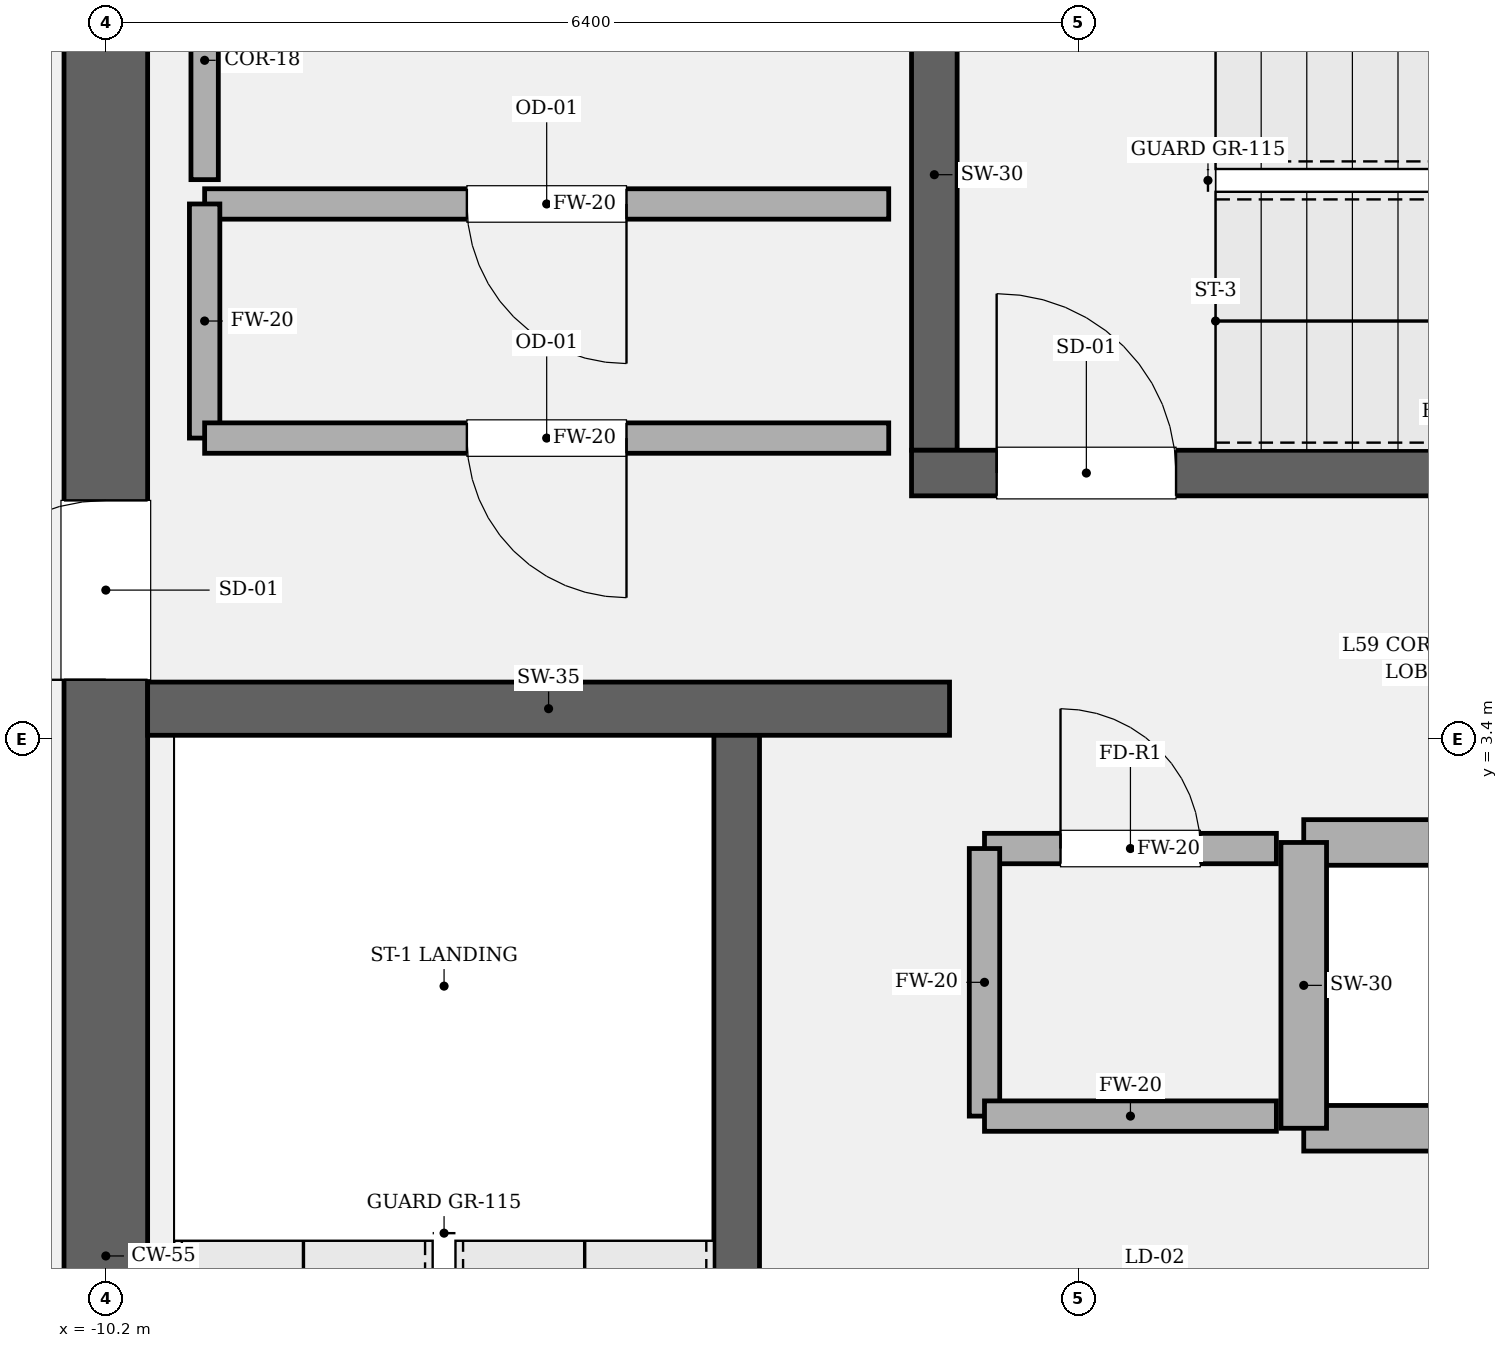
"""IFC4 building model, lengths in metres.
Left out: names, types, materials, properties, quantities, classifications, styles, units other than length and angle.
Written with IfcOpenShell. Run it as: python <this file> out.ifc"""

import sys

from ifc_helpers import new_model, si_unit, direction, frame, frame_2d, origin, place, context, subcontext, project, spatial, rectangle, extrude, element, fill, save


model = new_model("IFC4")
c1 = context("Model", 3, precision=1e-05, world=origin(), true_north=direction((0.0, 1.0)))
c2 = subcontext(c1, "Body", "Model", "MODEL_VIEW")
j1 = project(units=[si_unit("LENGTHUNIT", "METRE"), si_unit("PLANEANGLEUNIT", "RADIAN")], contexts=[c1])
p1 = place(None, origin())
s1 = spatial("IfcSite", under=j1, at=p1, CompositionType="ELEMENT")
p2 = place(p1, origin())
s2 = spatial("IfcBuilding", under=s1, at=p2, CompositionType="ELEMENT")
p3 = place(p2, frame((0.0, 0.0, 251.4)))
s3 = spatial("IfcBuildingStorey", under=s2, at=p3, CompositionType="ELEMENT", Elevation=251.4)
p4 = place(p3, frame((-10.2, -8.925, 0.0), z_axis=(0.0, 0.0, 1.0), x_axis=(0.0, 1.0, 0.0)))
e1 = element("IfcWall", 1, at=p4, inside=s3, PredefinedType="SHEAR", context=c2, shape_type="SweptSolid", body=[
    extrude(rectangle(XDim=17.85, YDim=0.55, at=frame_2d((8.925, 0.0))), origin(), (0.0, 0.0, 1.0), 4.05),
])
p5 = place(p4, frame((12.715, 0.0, 0.0)))
e2 = element("IfcOpeningElement", 2, at=p5, cuts=e1, PredefinedType="OPENING", context=c2, shape_type="SweptSolid", body=[
    extrude(rectangle(XDim=1.18, YDim=2.2, at=frame_2d((0.59, 1.1))), frame((0.0, 0.285, 0.0), z_axis=(0.0, -1.0, 0.0), x_axis=(1.0, 0.0, 0.0)), (0.0, 0.0, 1.0), 0.57),
])
p6 = place(p3, frame((-6.05, -5.5, 0.0), z_axis=(0.0, 0.0, 1.0), x_axis=(0.0, 1.0, 0.0)))
e3 = element("IfcWall", 3, at=p6, inside=s3, PredefinedType="SOLIDWALL", context=c2, shape_type="SweptSolid", body=[
    extrude(rectangle(XDim=8.95, YDim=0.3, at=frame_2d((4.475, 0.0))), origin(), (0.0, 0.0, 1.0), 4.05),
])
p7 = place(p3, frame((-4.75, 5.3, 0.0), z_axis=(0.0, 0.0, 1.0), x_axis=(0.0, 1.0, 0.0)))
e4 = element("IfcWall", 4, at=p7, inside=s3, PredefinedType="SOLIDWALL", context=c2, shape_type="SweptSolid", body=[
    extrude(rectangle(XDim=3.625, YDim=0.3, at=frame_2d((1.812, 0.0))), origin(), (0.0, 0.0, 1.0), 4.05),
])
p8 = place(p3, frame((-4.9, 5.15, 0.0), z_axis=(0.0, 0.0, 1.0), x_axis=(1.0, 0.0, 0.0)))
e5 = element("IfcWall", 5, at=p8, inside=s3, PredefinedType="SOLIDWALL", context=c2, shape_type="SweptSolid", body=[
    extrude(rectangle(XDim=9.8, YDim=0.3, at=frame_2d((4.9, 0.0))), origin(), (0.0, 0.0, 1.0), 4.05),
])
p9 = place(p8, frame((0.56, 0.0, 0.0)))
e6 = element("IfcOpeningElement", 6, at=p9, cuts=e5, PredefinedType="OPENING", context=c2, shape_type="SweptSolid", body=[
    extrude(rectangle(XDim=1.18, YDim=2.2, at=frame_2d((0.59, 1.1))), frame((0.0, 0.16, 0.0), z_axis=(0.0, -1.0, 0.0), x_axis=(1.0, 0.0, 0.0)), (0.0, 0.0, 1.0), 0.32),
])
p10 = place(p3, frame((-9.925, 3.6, 0.0), z_axis=(0.0, 0.0, 1.0), x_axis=(1.0, 0.0, 0.0)))
e7 = element("IfcWall", 7, at=p10, inside=s3, PredefinedType="SOLIDWALL", context=c2, shape_type="SweptSolid", body=[
    extrude(rectangle(XDim=5.275, YDim=0.35, at=frame_2d((2.638, 0.0))), origin(), (0.0, 0.0, 1.0), 4.05),
])
for number, where, z_axis, x_axis in (
    (8, (-2.32, 0.84, 0.0), (0.0, 0.0, 1.0), (1.0, 0.0, 0.0)),
    (9, (-2.32, 2.72, 0.0), (0.0, 0.0, 1.0), (1.0, 0.0, 0.0)),
):
    element("IfcWall", number, at=place(p3, frame(where, z_axis=z_axis, x_axis=x_axis)), inside=s3, PredefinedType="SOLIDWALL", context=c2, shape_type="SweptSolid", body=[
        extrude(rectangle(XDim=4.64, YDim=0.3, at=frame_2d((2.32, 0.0))), origin(), (0.0, 0.0, 1.0), 3.85),
    ])
p11 = place(p3, frame((-2.32, 0.84, 0.0), z_axis=(0.0, 0.0, 1.0), x_axis=(0.0, 1.0, 0.0)))
e10 = element("IfcWall", 10, at=p11, inside=s3, PredefinedType="SOLIDWALL", context=c2, shape_type="SweptSolid", body=[
    extrude(rectangle(XDim=1.88, YDim=0.3, at=frame_2d((0.94, 0.0))), origin(), (0.0, 0.0, 1.0), 3.85),
])
p12 = place(p3, frame((-2.5, 2.68, 0.0), z_axis=(0.0, 0.0, 1.0), x_axis=(-1.0, 0.0, 0.0)))
e11 = element("IfcWall", 11, at=p12, inside=s3, PredefinedType="SOLIDWALL", context=c2, shape_type="SweptSolid", body=[
    extrude(rectangle(XDim=1.92, YDim=0.2, at=frame_2d((0.96, 0.0))), origin(), (0.0, 0.0, 1.0), 3.85),
])
p13 = place(p12, frame((0.5, 0.0, 0.0)))
e12 = element("IfcOpeningElement", 12, at=p13, cuts=e11, PredefinedType="OPENING", context=c2, shape_type="SweptSolid", body=[
    extrude(rectangle(XDim=0.92, YDim=2.1, at=frame_2d((0.46, 1.05))), frame((0.0, 0.11, 0.0), z_axis=(0.0, -1.0, 0.0), x_axis=(1.0, 0.0, 0.0)), (0.0, 0.0, 1.0), 0.22),
])
p14 = place(p3, frame((-4.42, 2.68, 0.0), z_axis=(0.0, 0.0, 1.0), x_axis=(0.0, -1.0, 0.0)))
e13 = element("IfcWall", 13, at=p14, inside=s3, PredefinedType="SOLIDWALL", context=c2, shape_type="SweptSolid", body=[
    extrude(rectangle(XDim=1.76, YDim=0.2, at=frame_2d((0.88, 0.0))), origin(), (0.0, 0.0, 1.0), 3.85),
])
p15 = place(p3, frame((-4.42, 0.92, 0.0), z_axis=(0.0, 0.0, 1.0), x_axis=(1.0, 0.0, 0.0)))
e14 = element("IfcWall", 14, at=p15, inside=s3, PredefinedType="SOLIDWALL", context=c2, shape_type="SweptSolid", body=[
    extrude(rectangle(XDim=1.92, YDim=0.2, at=frame_2d((0.96, 0.0))), origin(), (0.0, 0.0, 1.0), 3.85),
])
p16 = place(p3, frame((-5.05, 6.92, 0.0), z_axis=(0.0, 0.0, 1.0), x_axis=(-1.0, 0.0, 0.0)))
e15 = element("IfcWall", 15, at=p16, inside=s3, PredefinedType="SOLIDWALL", context=c2, shape_type="SweptSolid", body=[
    extrude(rectangle(XDim=4.5, YDim=0.2, at=frame_2d((2.25, 0.0))), origin(), (0.0, 0.0, 1.0), 3.85),
])
p17 = place(p16, frame((1.725, 0.0, 0.0)))
e16 = element("IfcOpeningElement", 16, at=p17, cuts=e15, PredefinedType="OPENING", context=c2, shape_type="SweptSolid", body=[
    extrude(rectangle(XDim=1.05, YDim=2.2, at=frame_2d((0.525, 1.1))), frame((0.0, 0.11, 0.0), z_axis=(0.0, -1.0, 0.0), x_axis=(1.0, 0.0, 0.0)), (0.0, 0.0, 1.0), 0.22),
])
p18 = place(p3, frame((-9.55, 6.92, 0.0), z_axis=(0.0, 0.0, 1.0), x_axis=(0.0, -1.0, 0.0)))
e17 = element("IfcWall", 17, at=p18, inside=s3, PredefinedType="SOLIDWALL", context=c2, shape_type="SweptSolid", body=[
    extrude(rectangle(XDim=1.54, YDim=0.2, at=frame_2d((0.77, 0.0))), origin(), (0.0, 0.0, 1.0), 3.85),
])
p19 = place(p3, frame((-9.55, 5.38, 0.0), z_axis=(0.0, 0.0, 1.0), x_axis=(1.0, 0.0, 0.0)))
e18 = element("IfcWall", 18, at=p19, inside=s3, PredefinedType="SOLIDWALL", context=c2, shape_type="SweptSolid", body=[
    extrude(rectangle(XDim=4.5, YDim=0.2, at=frame_2d((2.25, 0.0))), origin(), (0.0, 0.0, 1.0), 3.85),
])
p20 = place(p19, frame((1.725, 0.0, 0.0)))
e19 = element("IfcOpeningElement", 19, at=p20, cuts=e18, PredefinedType="OPENING", context=c2, shape_type="SweptSolid", body=[
    extrude(rectangle(XDim=1.05, YDim=2.2, at=frame_2d((0.525, 1.1))), frame((0.0, 0.11, 0.0), z_axis=(0.0, -1.0, 0.0), x_axis=(1.0, 0.0, 0.0)), (0.0, 0.0, 1.0), 0.22),
])
p21 = place(p3, frame((-9.55, 8.65, 0.0), z_axis=(0.0, 0.0, 1.0), x_axis=(0.0, -1.0, 0.0)))
e20 = element("IfcWall", 20, at=p21, inside=s3, PredefinedType="PARTITIONING", context=c2, shape_type="SweptSolid", body=[
    extrude(rectangle(XDim=1.57, YDim=0.18, at=frame_2d((0.785, 0.0))), origin(), (0.0, 0.0, 1.0), 3.85),
])
p22 = place(p9, origin())
e21 = element("IfcDoor", 21, at=p22, inside=s3, OperationType="SINGLE_SWING_LEFT", PredefinedType="DOOR", context=c2, shape_type="SweptSolid", body=[
    extrude(rectangle(XDim=1.18, YDim=2.2, at=frame_2d((0.59, 1.1))), frame((0.0, 0.025, 0.0), z_axis=(0.0, -1.0, 0.0), x_axis=(1.0, 0.0, 0.0)), (0.0, 0.0, 1.0), 0.05),
])
fill(e6, e21)
p23 = place(p5, origin())
e22 = element("IfcDoor", 22, at=p23, inside=s3, OperationType="SINGLE_SWING_LEFT", PredefinedType="DOOR", context=c2, shape_type="SweptSolid", body=[
    extrude(rectangle(XDim=1.18, YDim=2.2, at=frame_2d((0.59, 1.1))), frame((0.0, 0.025, 0.0), z_axis=(0.0, -1.0, 0.0), x_axis=(1.0, 0.0, 0.0)), (0.0, 0.0, 1.0), 0.05),
])
fill(e2, e22)
p24 = place(p13, origin())
e23 = element("IfcDoor", 23, at=p24, inside=s3, OperationType="SINGLE_SWING_RIGHT", PredefinedType="DOOR", context=c2, shape_type="SweptSolid", body=[
    extrude(rectangle(XDim=0.92, YDim=2.1, at=frame_2d((0.46, 1.05))), frame((0.0, 0.025, 0.0), z_axis=(0.0, -1.0, 0.0), x_axis=(1.0, 0.0, 0.0)), (0.0, 0.0, 1.0), 0.05),
])
fill(e12, e23)
p25 = place(p20, origin())
e24 = element("IfcDoor", 24, at=p25, inside=s3, OperationType="SINGLE_SWING_RIGHT", PredefinedType="DOOR", context=c2, shape_type="SweptSolid", body=[
    extrude(rectangle(XDim=1.05, YDim=2.2, at=frame_2d((0.525, 1.1))), frame((0.0, 0.025, 0.0), z_axis=(0.0, -1.0, 0.0), x_axis=(1.0, 0.0, 0.0)), (0.0, 0.0, 1.0), 0.05),
])
fill(e19, e24)
p26 = place(p17, origin())
e25 = element("IfcDoor", 25, at=p26, inside=s3, OperationType="SINGLE_SWING_LEFT", PredefinedType="DOOR", context=c2, shape_type="SweptSolid", body=[
    extrude(rectangle(XDim=1.05, YDim=2.2, at=frame_2d((0.525, 1.1))), frame((0.0, 0.025, 0.0), z_axis=(0.0, -1.0, 0.0), x_axis=(1.0, 0.0, 0.0)), (0.0, 0.0, 1.0), 0.05),
])
fill(e16, e25)
save(model, sys.argv[1])
